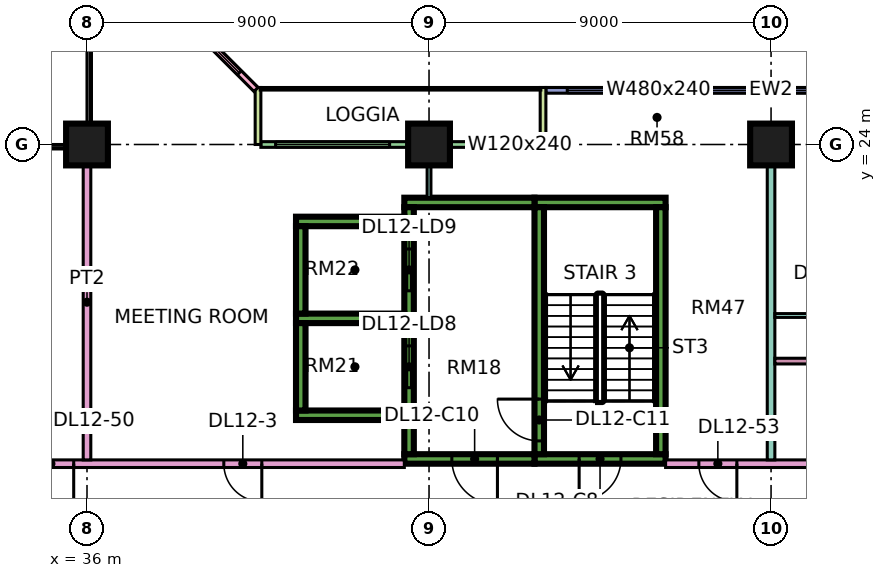
"""IFC4 building model, lengths in metres.
Left out: names, types, materials, properties, quantities, classifications, styles, units other than length and angle.
Written with IfcOpenShell. Run it as: python <this file> out.ifc"""

import sys

from ifc_helpers import new_model, si_unit, direction, frame, frame_2d, origin, origin_2d, place, context, subcontext, project, spatial, rectangle, extrude, element, fill, save


model = new_model("IFC4")
c1 = context("Model", 3, precision=1e-05, world=origin(), true_north=direction((0.0, 1.0)))
c2 = subcontext(c1, "Body", "Model", "MODEL_VIEW")
j1 = project(units=[si_unit("LENGTHUNIT", "METRE"), si_unit("PLANEANGLEUNIT", "RADIAN")], contexts=[c1])
p1 = place(None, origin())
s1 = spatial("IfcSite", under=j1, at=p1, CompositionType="ELEMENT")
p2 = place(p1, origin())
s2 = spatial("IfcBuilding", under=s1, at=p2, CompositionType="ELEMENT")
p3 = place(p2, frame((0.0, 0.0, 60.15)))
s3 = spatial("IfcBuildingStorey", under=s2, at=p3, CompositionType="ELEMENT", Elevation=60.15)
for number, where, z_axis, x_axis in (
    (1, (36.0, 24.0, 0.0), (0.0, 0.0, 1.0), (1.0, 0.0, 0.0)),
    (2, (45.0, 24.0, 0.0), (0.0, 0.0, 1.0), (1.0, 0.0, 0.0)),
    (3, (54.0, 24.0, 0.0), (0.0, 0.0, 1.0), (1.0, 0.0, 0.0)),
):
    element("IfcColumn", number, at=place(p3, frame(where, z_axis=z_axis, x_axis=x_axis)), inside=s3, PredefinedType="COLUMN", context=c2, shape_type="SweptSolid", body=[
        extrude(rectangle(XDim=1.1, YDim=1.1, at=origin_2d()), origin(), (0.0, 0.0, 1.0), 3.75),
    ])
p4 = place(p3, frame((47.775, 15.725, 0.0), z_axis=(0.0, 0.0, 1.0), x_axis=(1.0, 0.0, 0.0)))
e4 = element("IfcWall", 4, at=p4, inside=s3, PredefinedType="SHEAR", context=c2, shape_type="SweptSolid", body=[
    extrude(rectangle(XDim=3.45, YDim=0.25, at=frame_2d((1.725, 0.0))), origin(), (0.0, 0.0, 1.0), 3.75),
])
p5 = place(p4, frame((1.175, 0.0, 0.0)))
e5 = element("IfcOpeningElement", 5, at=p5, cuts=e4, PredefinedType="OPENING", context=c2, shape_type="SweptSolid", body=[
    extrude(rectangle(XDim=1.1, YDim=2.2, at=frame_2d((0.55, 1.1))), frame((0.0, 0.135, 0.0), z_axis=(0.0, -1.0, 0.0), x_axis=(1.0, 0.0, 0.0)), (0.0, 0.0, 1.0), 0.27),
])
p6 = place(p3, frame((47.775, 22.475, 0.0), z_axis=(0.0, 0.0, 1.0), x_axis=(1.0, 0.0, 0.0)))
e6 = element("IfcWall", 6, at=p6, inside=s3, PredefinedType="SHEAR", context=c2, shape_type="SweptSolid", body=[
    extrude(rectangle(XDim=3.45, YDim=0.25, at=frame_2d((1.725, 0.0))), origin(), (0.0, 0.0, 1.0), 3.75),
])
p7 = place(p3, frame((47.9, 15.85, 0.0), z_axis=(0.0, 0.0, 1.0), x_axis=(0.0, 1.0, 0.0)))
e7 = element("IfcWall", 7, at=p7, inside=s3, PredefinedType="SHEAR", context=c2, shape_type="SweptSolid", body=[
    extrude(rectangle(XDim=6.5, YDim=0.25, at=frame_2d((3.25, 0.0))), origin(), (0.0, 0.0, 1.0), 3.75),
])
p8 = place(p7, frame((0.35, 0.0, 0.0)))
e8 = element("IfcOpeningElement", 8, at=p8, cuts=e7, PredefinedType="OPENING", context=c2, shape_type="SweptSolid", body=[
    extrude(rectangle(XDim=1.1, YDim=2.2, at=frame_2d((0.55, 1.1))), frame((0.0, 0.135, 0.0), z_axis=(0.0, -1.0, 0.0), x_axis=(1.0, 0.0, 0.0)), (0.0, 0.0, 1.0), 0.27),
])
p9 = place(p3, frame((51.1, 15.85, 0.0), z_axis=(0.0, 0.0, 1.0), x_axis=(0.0, 1.0, 0.0)))
e9 = element("IfcWall", 9, at=p9, inside=s3, PredefinedType="SHEAR", context=c2, shape_type="SweptSolid", body=[
    extrude(rectangle(XDim=6.5, YDim=0.25, at=frame_2d((3.25, 0.0))), origin(), (0.0, 0.0, 1.0), 3.75),
])
p10 = place(p3, frame((44.35, 15.725, 0.0), z_axis=(0.0, 0.0, 1.0), x_axis=(1.0, 0.0, 0.0)))
e10 = element("IfcWall", 10, at=p10, inside=s3, PredefinedType="SHEAR", context=c2, shape_type="SweptSolid", body=[
    extrude(rectangle(XDim=3.425, YDim=0.25, at=frame_2d((1.712, 0.0))), origin(), (0.0, 0.0, 1.0), 3.75),
])
p11 = place(p10, frame((1.25, 0.0, 0.0)))
e11 = element("IfcOpeningElement", 11, at=p11, cuts=e10, PredefinedType="OPENING", context=c2, shape_type="SweptSolid", body=[
    extrude(rectangle(XDim=1.2, YDim=2.2, at=frame_2d((0.6, 1.1))), frame((0.0, 0.135, 0.0), z_axis=(0.0, -1.0, 0.0), x_axis=(1.0, 0.0, 0.0)), (0.0, 0.0, 1.0), 0.27),
])
p12 = place(p3, frame((44.35, 22.475, 0.0), z_axis=(0.0, 0.0, 1.0), x_axis=(1.0, 0.0, 0.0)))
e12 = element("IfcWall", 12, at=p12, inside=s3, PredefinedType="SHEAR", context=c2, shape_type="SweptSolid", body=[
    extrude(rectangle(XDim=3.425, YDim=0.25, at=frame_2d((1.712, 0.0))), origin(), (0.0, 0.0, 1.0), 3.75),
])
p13 = place(p3, frame((44.475, 15.85, 0.0), z_axis=(0.0, 0.0, 1.0), x_axis=(0.0, 1.0, 0.0)))
e13 = element("IfcWall", 13, at=p13, inside=s3, PredefinedType="SHEAR", context=c2, shape_type="SweptSolid", body=[
    extrude(rectangle(XDim=6.5, YDim=0.25, at=frame_2d((3.25, 0.0))), origin(), (0.0, 0.0, 1.0), 3.75),
])
p14 = place(p13, frame((1.75, 0.0, 0.0)))
e14 = element("IfcOpeningElement", 14, at=p14, cuts=e13, PredefinedType="OPENING", context=c2, shape_type="SweptSolid", body=[
    extrude(rectangle(XDim=1.1, YDim=2.2, at=frame_2d((0.55, 1.1))), frame((0.0, 0.135, 0.0), z_axis=(0.0, -1.0, 0.0), x_axis=(1.0, 0.0, 0.0)), (0.0, 0.0, 1.0), 0.27),
])
p15 = place(p13, frame((4.3, 0.0, 0.0)))
e15 = element("IfcOpeningElement", 15, at=p15, cuts=e13, PredefinedType="OPENING", context=c2, shape_type="SweptSolid", body=[
    extrude(rectangle(XDim=1.1, YDim=2.2, at=frame_2d((0.55, 1.1))), frame((0.0, 0.135, 0.0), z_axis=(0.0, -1.0, 0.0), x_axis=(1.0, 0.0, 0.0)), (0.0, 0.0, 1.0), 0.27),
])
for number, where, z_axis, x_axis in (
    (16, (41.5, 16.875, 0.0), (0.0, 0.0, 1.0), (1.0, 0.0, 0.0)),
    (17, (41.5, 19.425, 0.0), (0.0, 0.0, 1.0), (1.0, 0.0, 0.0)),
    (18, (41.5, 21.975, 0.0), (0.0, 0.0, 1.0), (1.0, 0.0, 0.0)),
):
    element("IfcWall", number, at=place(p3, frame(where, z_axis=z_axis, x_axis=x_axis)), inside=s3, PredefinedType="SHEAR", context=c2, shape_type="SweptSolid", body=[
        extrude(rectangle(XDim=2.85, YDim=0.25, at=frame_2d((1.425, 0.0))), origin(), (0.0, 0.0, 1.0), 3.75),
    ])
for number, where, z_axis, x_axis in (
    (19, (41.625, 17.0, 0.0), (0.0, 0.0, 1.0), (0.0, 1.0, 0.0)),
    (20, (41.625, 19.55, 0.0), (0.0, 0.0, 1.0), (0.0, 1.0, 0.0)),
):
    element("IfcWall", number, at=place(p3, frame(where, z_axis=z_axis, x_axis=x_axis)), inside=s3, PredefinedType="SHEAR", context=c2, shape_type="SweptSolid", body=[
        extrude(rectangle(XDim=2.3, YDim=0.25, at=frame_2d((1.15, 0.0))), origin(), (0.0, 0.0, 1.0), 3.75),
    ])
p16 = place(p3, frame((59.925, 25.425, 0.0), z_axis=(0.0, 0.0, 1.0), x_axis=(-1.0, 0.0, 0.0)))
e21 = element("IfcWall", 21, at=p16, inside=s3, PredefinedType="SOLIDWALL", context=c2, shape_type="SweptSolid", body=[
    extrude(rectangle(XDim=11.85, YDim=0.15, at=frame_2d((5.925, 0.0))), origin(), (0.0, 0.0, 1.0), 3.35),
])
p17 = place(p16, frame((0.562, 0.0, 0.45)))
e22 = element("IfcOpeningElement", 22, at=p17, cuts=e21, PredefinedType="OPENING", context=c2, shape_type="SweptSolid", body=[
    extrude(rectangle(XDim=1.8, YDim=2.4, at=frame_2d((0.9, 1.2))), frame((0.0, 0.085, 0.0), z_axis=(0.0, -1.0, 0.0), x_axis=(1.0, 0.0, 0.0)), (0.0, 0.0, 1.0), 0.17),
])
p18 = place(p16, frame((3.525, 0.0, 0.45)))
e23 = element("IfcOpeningElement", 23, at=p18, cuts=e21, PredefinedType="OPENING", context=c2, shape_type="SweptSolid", body=[
    extrude(rectangle(XDim=1.8, YDim=2.4, at=frame_2d((0.9, 1.2))), frame((0.0, 0.085, 0.0), z_axis=(0.0, -1.0, 0.0), x_axis=(1.0, 0.0, 0.0)), (0.0, 0.0, 1.0), 0.17),
])
p19 = place(p16, frame((6.488, 0.0, 0.45)))
e24 = element("IfcOpeningElement", 24, at=p19, cuts=e21, PredefinedType="OPENING", context=c2, shape_type="SweptSolid", body=[
    extrude(rectangle(XDim=4.8, YDim=2.4, at=frame_2d((2.4, 1.2))), frame((0.0, 0.085, 0.0), z_axis=(0.0, -1.0, 0.0), x_axis=(1.0, 0.0, 0.0)), (0.0, 0.0, 1.0), 0.17),
])
p20 = place(p3, frame((47.925, 24.0, 0.0), z_axis=(0.0, 0.0, 1.0), x_axis=(-1.0, 0.0, 0.0)))
e25 = element("IfcWall", 25, at=p20, inside=s3, PredefinedType="SOLIDWALL", context=c2, shape_type="SweptSolid", body=[
    extrude(rectangle(XDim=7.35, YDim=0.15, at=frame_2d((3.675, 0.0))), origin(), (0.0, 0.0, 1.0), 3.35),
])
p21 = place(p20, frame((0.538, 0.0, 0.45)))
e26 = element("IfcOpeningElement", 26, at=p21, cuts=e25, PredefinedType="OPENING", context=c2, shape_type="SweptSolid", body=[
    extrude(rectangle(XDim=1.2, YDim=2.4, at=frame_2d((0.6, 1.2))), frame((0.0, 0.085, 0.0), z_axis=(0.0, -1.0, 0.0), x_axis=(1.0, 0.0, 0.0)), (0.0, 0.0, 1.0), 0.17),
])
p22 = place(p20, frame((3.962, 0.0, 0.45)))
e27 = element("IfcOpeningElement", 27, at=p22, cuts=e25, PredefinedType="OPENING", context=c2, shape_type="SweptSolid", body=[
    extrude(rectangle(XDim=3.0, YDim=2.4, at=frame_2d((1.5, 1.2))), frame((0.0, 0.085, 0.0), z_axis=(0.0, -1.0, 0.0), x_axis=(1.0, 0.0, 0.0)), (0.0, 0.0, 1.0), 0.17),
])
for number, where, z_axis, x_axis in (
    (28, (48.0, 25.5, 0.0), (0.0, 0.0, 1.0), (0.0, -1.0, 0.0)),
    (29, (40.5, 25.5, 0.0), (0.0, 0.0, 1.0), (0.0, -1.0, 0.0)),
):
    element("IfcWall", number, at=place(p3, frame(where, z_axis=z_axis, x_axis=x_axis)), inside=s3, PredefinedType="SOLIDWALL", context=c2, shape_type="SweptSolid", body=[
        extrude(rectangle(XDim=1.5, YDim=0.15, at=frame_2d((0.75, 0.0))), origin(), (0.0, 0.0, 1.0), 3.35),
    ])
p23 = place(p3, frame((40.447, 25.447, 0.0), z_axis=(0.0, 0.0, 1.0), x_axis=(-0.707106781187, 0.707106781187, 0.0)))
e30 = element("IfcWall", 30, at=p23, inside=s3, PredefinedType="SOLIDWALL", context=c2, shape_type="SweptSolid", body=[
    extrude(rectangle(XDim=4.243, YDim=0.15, at=frame_2d((2.121, 0.0))), origin(), (0.0, 0.0, 1.0), 3.35),
])
p24 = place(p23, frame((0.621, 0.0, 0.45)))
e31 = element("IfcOpeningElement", 31, at=p24, cuts=e30, PredefinedType="OPENING", context=c2, shape_type="SweptSolid", body=[
    extrude(rectangle(XDim=3.0, YDim=2.4, at=frame_2d((1.5, 1.2))), frame((0.0, 0.085, 0.0), z_axis=(0.0, -1.0, 0.0), x_axis=(1.0, 0.0, 0.0)), (0.0, 0.0, 1.0), 0.17),
])
p25 = place(p3, frame((34.0, 15.6, 0.0), z_axis=(0.0, 0.0, 1.0), x_axis=(1.0, 0.0, 0.0)))
e32 = element("IfcWall", 32, at=p25, inside=s3, PredefinedType="PARTITIONING", context=c2, shape_type="SweptSolid", body=[
    extrude(rectangle(XDim=10.35, YDim=0.2, at=frame_2d((5.175, 0.0))), origin(), (0.0, 0.0, 1.0), 3.35),
])
p26 = place(p25, frame((5.6, 0.0, 0.0)))
e33 = element("IfcOpeningElement", 33, at=p26, cuts=e32, PredefinedType="OPENING", context=c2, shape_type="SweptSolid", body=[
    extrude(rectangle(XDim=1.0, YDim=2.1, at=frame_2d((0.5, 1.05))), frame((0.0, 0.11, 0.0), z_axis=(0.0, -1.0, 0.0), x_axis=(1.0, 0.0, 0.0)), (0.0, 0.0, 1.0), 0.22),
])
p27 = place(p25, frame((0.45, 0.0, 0.0)))
e34 = element("IfcOpeningElement", 34, at=p27, cuts=e32, PredefinedType="OPENING", context=c2, shape_type="SweptSolid", body=[
    extrude(rectangle(XDim=1.2, YDim=2.1, at=frame_2d((0.6, 1.05))), frame((0.0, 0.11, 0.0), z_axis=(0.0, -1.0, 0.0), x_axis=(1.0, 0.0, 0.0)), (0.0, 0.0, 1.0), 0.22),
])
p28 = place(p3, frame((36.0, 15.7, 0.0), z_axis=(0.0, 0.0, 1.0), x_axis=(0.0, 1.0, 0.0)))
e35 = element("IfcWall", 35, at=p28, inside=s3, PredefinedType="PARTITIONING", context=c2, shape_type="SweptSolid", body=[
    extrude(rectangle(XDim=8.3, YDim=0.2, at=frame_2d((4.15, 0.0))), origin(), (0.0, 0.0, 1.0), 3.35),
])
p29 = place(p3, frame((45.0, 22.6, 0.0), z_axis=(0.0, 0.0, 1.0), x_axis=(0.0, 1.0, 0.0)))
e36 = element("IfcWall", 36, at=p29, inside=s3, PredefinedType="PARTITIONING", context=c2, shape_type="SweptSolid", body=[
    extrude(rectangle(XDim=1.326, YDim=0.1, at=frame_2d((0.663, 0.0))), origin(), (0.0, 0.0, 1.0), 3.35),
])
p30 = place(p3, frame((51.225, 15.6, 0.0), z_axis=(0.0, 0.0, 1.0), x_axis=(1.0, 0.0, 0.0)))
e37 = element("IfcWall", 37, at=p30, inside=s3, PredefinedType="PARTITIONING", context=c2, shape_type="SweptSolid", body=[
    extrude(rectangle(XDim=20.701, YDim=0.2, at=frame_2d((10.351, 0.0))), origin(), (0.0, 0.0, 1.0), 3.35),
])
p31 = place(p30, frame((12.575, 0.0, 0.0)))
e38 = element("IfcOpeningElement", 38, at=p31, cuts=e37, PredefinedType="OPENING", context=c2, shape_type="SweptSolid", body=[
    extrude(rectangle(XDim=1.0, YDim=2.1, at=frame_2d((0.5, 1.05))), frame((0.0, 0.11, 0.0), z_axis=(0.0, -1.0, 0.0), x_axis=(1.0, 0.0, 0.0)), (0.0, 0.0, 1.0), 0.22),
])
p32 = place(p30, frame((0.875, 0.0, 0.0)))
e39 = element("IfcOpeningElement", 39, at=p32, cuts=e37, PredefinedType="OPENING", context=c2, shape_type="SweptSolid", body=[
    extrude(rectangle(XDim=1.0, YDim=2.1, at=frame_2d((0.5, 1.05))), frame((0.0, 0.11, 0.0), z_axis=(0.0, -1.0, 0.0), x_axis=(1.0, 0.0, 0.0)), (0.0, 0.0, 1.0), 0.22),
])
p33 = place(p3, frame((54.0, 15.7, 0.0), z_axis=(0.0, 0.0, 1.0), x_axis=(0.0, 1.0, 0.0)))
e40 = element("IfcWall", 40, at=p33, inside=s3, PredefinedType="PARTITIONING", context=c2, shape_type="SweptSolid", body=[
    extrude(rectangle(XDim=8.3, YDim=0.2, at=frame_2d((4.15, 0.0))), origin(), (0.0, 0.0, 1.0), 3.35),
])
p34 = place(p3, frame((54.1, 18.3, 0.0), z_axis=(0.0, 0.0, 1.0), x_axis=(1.0, 0.0, 0.0)))
e41 = element("IfcWall", 41, at=p34, inside=s3, PredefinedType="PARTITIONING", context=c2, shape_type="SweptSolid", body=[
    extrude(rectangle(XDim=8.975, YDim=0.15, at=frame_2d((4.487, 0.0))), origin(), (0.0, 0.0, 1.0), 3.35),
])
p35 = place(p34, frame((2.6, 0.0, 0.0)))
e42 = element("IfcOpeningElement", 42, at=p35, cuts=e41, PredefinedType="OPENING", context=c2, shape_type="SweptSolid", body=[
    extrude(rectangle(XDim=0.9, YDim=2.1, at=frame_2d((0.45, 1.05))), frame((0.0, 0.085, 0.0), z_axis=(0.0, -1.0, 0.0), x_axis=(1.0, 0.0, 0.0)), (0.0, 0.0, 1.0), 0.17),
])
p36 = place(p3, frame((54.1, 19.5, 0.0), z_axis=(0.0, 0.0, 1.0), x_axis=(1.0, 0.0, 0.0)))
e43 = element("IfcWall", 43, at=p36, inside=s3, PredefinedType="PARTITIONING", context=c2, shape_type="SweptSolid", body=[
    extrude(rectangle(XDim=8.95, YDim=0.1, at=frame_2d((4.475, 0.0))), origin(), (0.0, 0.0, 1.0), 3.35),
])
p37 = place(p36, frame((0.95, 0.0, 0.0)))
e44 = element("IfcOpeningElement", 44, at=p37, cuts=e43, PredefinedType="OPENING", context=c2, shape_type="SweptSolid", body=[
    extrude(rectangle(XDim=0.9, YDim=2.1, at=frame_2d((0.45, 1.05))), frame((0.0, 0.06, 0.0), z_axis=(0.0, -1.0, 0.0), x_axis=(1.0, 0.0, 0.0)), (0.0, 0.0, 1.0), 0.12),
])
p38 = place(p36, frame((3.95, 0.0, 0.0)))
e45 = element("IfcOpeningElement", 45, at=p38, cuts=e43, PredefinedType="OPENING", context=c2, shape_type="SweptSolid", body=[
    extrude(rectangle(XDim=0.9, YDim=2.1, at=frame_2d((0.45, 1.05))), frame((0.0, 0.06, 0.0), z_axis=(0.0, -1.0, 0.0), x_axis=(1.0, 0.0, 0.0)), (0.0, 0.0, 1.0), 0.12),
])
p39 = place(p36, frame((6.95, 0.0, 0.0)))
e46 = element("IfcOpeningElement", 46, at=p39, cuts=e43, PredefinedType="OPENING", context=c2, shape_type="SweptSolid", body=[
    extrude(rectangle(XDim=0.9, YDim=2.1, at=frame_2d((0.45, 1.05))), frame((0.0, 0.06, 0.0), z_axis=(0.0, -1.0, 0.0), x_axis=(1.0, 0.0, 0.0)), (0.0, 0.0, 1.0), 0.12),
])
p40 = place(p18, origin())
e47 = element("IfcWindow", 47, at=p40, inside=s3, PartitioningType="SINGLE_PANEL", PredefinedType="WINDOW", context=c2, shape_type="SweptSolid", body=[
    extrude(rectangle(XDim=1.8, YDim=2.4, at=frame_2d((0.9, 1.2))), frame((0.0, 0.03, 0.0), z_axis=(0.0, -1.0, 0.0), x_axis=(1.0, 0.0, 0.0)), (0.0, 0.0, 1.0), 0.06),
])
fill(e23, e47)
p41 = place(p19, origin())
e48 = element("IfcWindow", 48, at=p41, inside=s3, PartitioningType="SINGLE_PANEL", PredefinedType="WINDOW", context=c2, shape_type="SweptSolid", body=[
    extrude(rectangle(XDim=4.8, YDim=2.4, at=frame_2d((2.4, 1.2))), frame((0.0, 0.03, 0.0), z_axis=(0.0, -1.0, 0.0), x_axis=(1.0, 0.0, 0.0)), (0.0, 0.0, 1.0), 0.06),
])
fill(e24, e48)
p42 = place(p21, origin())
e49 = element("IfcWindow", 49, at=p42, inside=s3, PartitioningType="SINGLE_PANEL", PredefinedType="WINDOW", context=c2, shape_type="SweptSolid", body=[
    extrude(rectangle(XDim=1.2, YDim=2.4, at=frame_2d((0.6, 1.2))), frame((0.0, 0.03, 0.0), z_axis=(0.0, -1.0, 0.0), x_axis=(1.0, 0.0, 0.0)), (0.0, 0.0, 1.0), 0.06),
])
fill(e26, e49)
p43 = place(p22, origin())
e50 = element("IfcWindow", 50, at=p43, inside=s3, PartitioningType="SINGLE_PANEL", PredefinedType="WINDOW", context=c2, shape_type="SweptSolid", body=[
    extrude(rectangle(XDim=3.0, YDim=2.4, at=frame_2d((1.5, 1.2))), frame((0.0, 0.03, 0.0), z_axis=(0.0, -1.0, 0.0), x_axis=(1.0, 0.0, 0.0)), (0.0, 0.0, 1.0), 0.06),
])
fill(e27, e50)
p44 = place(p24, origin())
e51 = element("IfcWindow", 51, at=p44, inside=s3, PartitioningType="SINGLE_PANEL", PredefinedType="WINDOW", context=c2, shape_type="SweptSolid", body=[
    extrude(rectangle(XDim=3.0, YDim=2.4, at=frame_2d((1.5, 1.2))), frame((0.0, 0.03, 0.0), z_axis=(0.0, -1.0, 0.0), x_axis=(1.0, 0.0, 0.0)), (0.0, 0.0, 1.0), 0.06),
])
fill(e31, e51)
p45 = place(p5, frame((1.1, 0.0, 0.0), z_axis=(0.0, 0.0, 1.0), x_axis=(-1.0, 0.0, 0.0)))
e52 = element("IfcDoor", 52, at=p45, inside=s3, OperationType="SINGLE_SWING_LEFT", PredefinedType="DOOR", context=c2, shape_type="SweptSolid", body=[
    extrude(rectangle(XDim=1.1, YDim=2.2, at=frame_2d((0.55, 1.1))), frame((0.0, 0.025, 0.0), z_axis=(0.0, -1.0, 0.0), x_axis=(1.0, 0.0, 0.0)), (0.0, 0.0, 1.0), 0.05),
])
fill(e5, e52)
p46 = place(p11, origin())
e53 = element("IfcDoor", 53, at=p46, inside=s3, OperationType="SINGLE_SWING_RIGHT", PredefinedType="DOOR", context=c2, shape_type="SweptSolid", body=[
    extrude(rectangle(XDim=1.2, YDim=2.2, at=frame_2d((0.6, 1.1))), frame((0.0, 0.025, 0.0), z_axis=(0.0, -1.0, 0.0), x_axis=(1.0, 0.0, 0.0)), (0.0, 0.0, 1.0), 0.05),
])
fill(e11, e53)
p47 = place(p8, frame((1.1, 0.0, 0.0), z_axis=(0.0, 0.0, 1.0), x_axis=(-1.0, 0.0, 0.0)))
e54 = element("IfcDoor", 54, at=p47, inside=s3, OperationType="SINGLE_SWING_RIGHT", PredefinedType="DOOR", context=c2, shape_type="SweptSolid", body=[
    extrude(rectangle(XDim=1.1, YDim=2.2, at=frame_2d((0.55, 1.1))), frame((0.0, 0.025, 0.0), z_axis=(0.0, -1.0, 0.0), x_axis=(1.0, 0.0, 0.0)), (0.0, 0.0, 1.0), 0.05),
])
fill(e8, e54)
p48 = place(p14, origin())
e55 = element("IfcDoor", 55, at=p48, inside=s3, OperationType="DOUBLE_DOOR_SLIDING", PredefinedType="DOOR", context=c2, shape_type="SweptSolid", body=[
    extrude(rectangle(XDim=1.1, YDim=2.2, at=frame_2d((0.55, 1.1))), frame((0.0, 0.025, 0.0), z_axis=(0.0, -1.0, 0.0), x_axis=(1.0, 0.0, 0.0)), (0.0, 0.0, 1.0), 0.05),
])
fill(e14, e55)
p49 = place(p15, origin())
e56 = element("IfcDoor", 56, at=p49, inside=s3, OperationType="DOUBLE_DOOR_SLIDING", PredefinedType="DOOR", context=c2, shape_type="SweptSolid", body=[
    extrude(rectangle(XDim=1.1, YDim=2.2, at=frame_2d((0.55, 1.1))), frame((0.0, 0.025, 0.0), z_axis=(0.0, -1.0, 0.0), x_axis=(1.0, 0.0, 0.0)), (0.0, 0.0, 1.0), 0.05),
])
fill(e15, e56)
p50 = place(p26, origin())
e57 = element("IfcDoor", 57, at=p50, inside=s3, OperationType="SINGLE_SWING_RIGHT", PredefinedType="DOOR", context=c2, shape_type="SweptSolid", body=[
    extrude(rectangle(XDim=1.0, YDim=2.1, at=frame_2d((0.5, 1.05))), frame((0.0, 0.025, 0.0), z_axis=(0.0, -1.0, 0.0), x_axis=(1.0, 0.0, 0.0)), (0.0, 0.0, 1.0), 0.05),
])
fill(e33, e57)
p51 = place(p27, origin())
e58 = element("IfcDoor", 58, at=p51, inside=s3, OperationType="SINGLE_SWING_RIGHT", PredefinedType="DOOR", context=c2, shape_type="SweptSolid", body=[
    extrude(rectangle(XDim=1.2, YDim=2.1, at=frame_2d((0.6, 1.05))), frame((0.0, 0.025, 0.0), z_axis=(0.0, -1.0, 0.0), x_axis=(1.0, 0.0, 0.0)), (0.0, 0.0, 1.0), 0.05),
])
fill(e34, e58)
p52 = place(p32, origin())
e59 = element("IfcDoor", 59, at=p52, inside=s3, OperationType="SINGLE_SWING_RIGHT", PredefinedType="DOOR", context=c2, shape_type="SweptSolid", body=[
    extrude(rectangle(XDim=1.0, YDim=2.1, at=frame_2d((0.5, 1.05))), frame((0.0, 0.025, 0.0), z_axis=(0.0, -1.0, 0.0), x_axis=(1.0, 0.0, 0.0)), (0.0, 0.0, 1.0), 0.05),
])
fill(e39, e59)
save(model, sys.argv[1])
